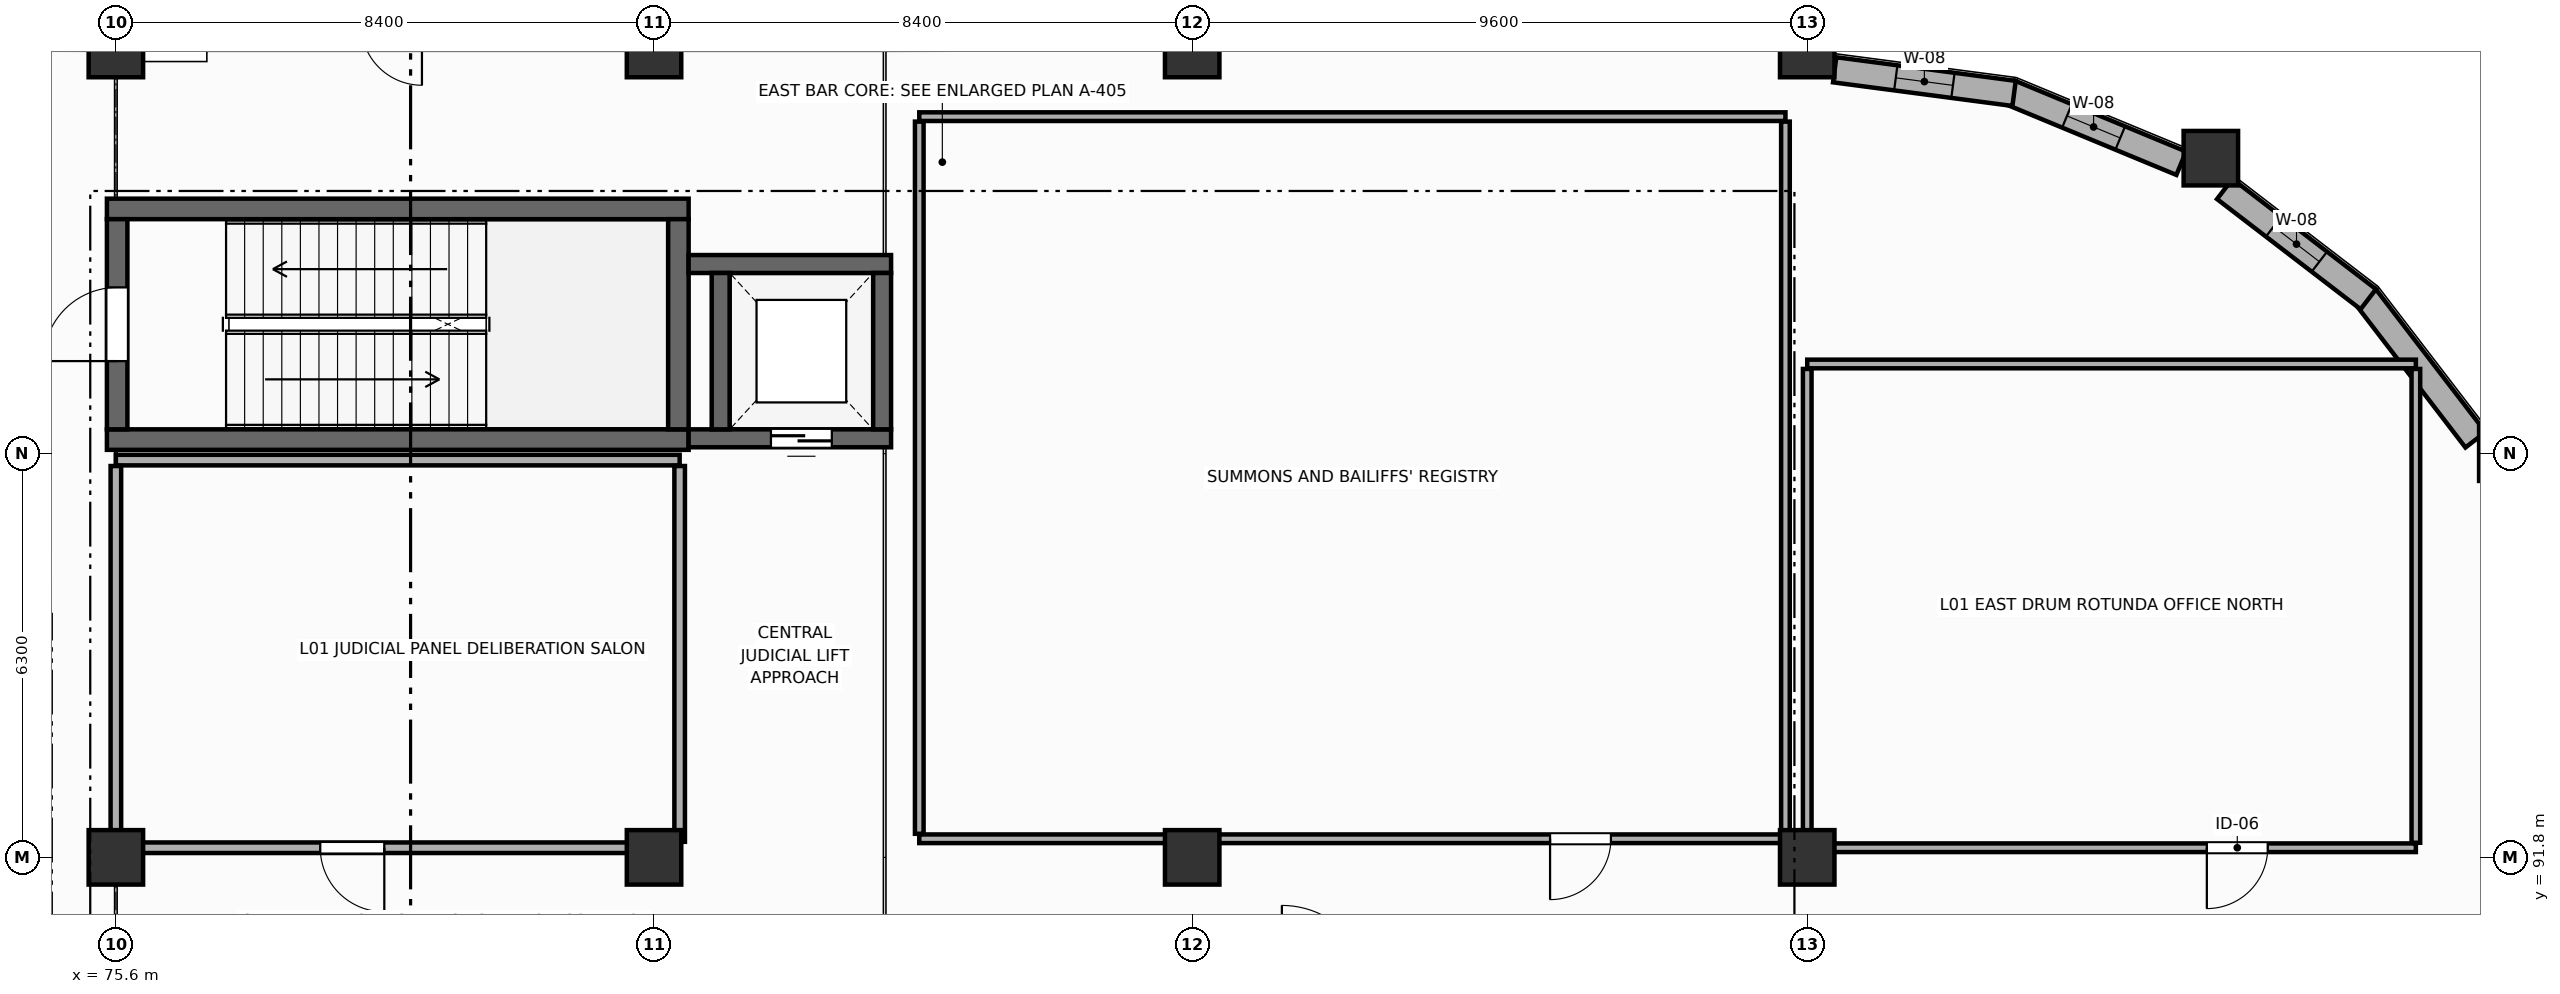
"""IFC4 building model, lengths in metres.
Left out: names, types, materials, properties, quantities, classifications, styles, units other than length and angle.
Written with IfcOpenShell. Run it as: python <this file> out.ifc"""

import sys

from ifc_helpers import new_model, si_unit, direction, frame, frame_2d, origin, origin_2d, place, context, subcontext, project, spatial, rectangle, circle, extrude, element, fill, save


model = new_model("IFC4")
c1 = context("Model", 3, precision=1e-05, world=origin(), true_north=direction((0.0, 1.0)))
c2 = subcontext(c1, "Body", "Model", "MODEL_VIEW")
j1 = project(units=[si_unit("LENGTHUNIT", "METRE"), si_unit("PLANEANGLEUNIT", "RADIAN")], contexts=[c1])
p1 = place(None, origin())
s1 = spatial("IfcSite", under=j1, at=p1, CompositionType="ELEMENT")
p2 = place(p1, origin())
s2 = spatial("IfcBuilding", under=s1, at=p2, CompositionType="ELEMENT")
p3 = place(p2, origin())
s3 = spatial("IfcBuildingStorey", under=s2, at=p3, CompositionType="ELEMENT", Elevation=0.0)
for number, where, z_axis, x_axis in (
    (1, (75.6, 91.8, 0.0), (0.0, 0.0, 1.0), (1.0, 0.0, 0.0)),
    (2, (75.6, 104.4, 0.0), (0.0, 0.0, 1.0), (1.0, 0.0, 0.0)),
    (3, (84.0, 91.8, 0.0), (0.0, 0.0, 1.0), (1.0, 0.0, 0.0)),
    (4, (84.0, 104.4, 0.0), (0.0, 0.0, 1.0), (1.0, 0.0, 0.0)),
    (5, (92.4, 91.8, 0.0), (0.0, 0.0, 1.0), (1.0, 0.0, 0.0)),
    (6, (92.4, 104.4, 0.0), (0.0, 0.0, 1.0), (1.0, 0.0, 0.0)),
    (7, (102.0, 91.8, 0.0), (0.0, 0.0, 1.0), (1.0, 0.0, 0.0)),
    (8, (102.0, 104.4, 0.0), (0.0, 0.0, 1.0), (1.0, 0.0, 0.0)),
):
    element("IfcColumn", number, at=place(p3, frame(where, z_axis=z_axis, x_axis=x_axis)), inside=s3, PredefinedType="COLUMN", context=c2, shape_type="SweptSolid", body=[
        extrude(rectangle(XDim=0.85, YDim=0.85, at=origin_2d()), origin(), (0.0, 0.0, 1.0), 5.4),
    ])
for number, where, z_axis, x_axis in (
    (9, (112.912, 98.1, 0.0), (0.0, 0.0, 1.0), (1.0, 0.0, 0.0)),
    (10, (108.3, 102.712, 0.0), (0.0, 0.0, 1.0), (1.0, 0.0, 0.0)),
):
    element("IfcColumn", number, at=place(p3, frame(where, z_axis=z_axis, x_axis=x_axis)), inside=s3, PredefinedType="COLUMN", context=c2, shape_type="SweptSolid", body=[
        extrude(circle(Radius=0.425, at=origin_2d()), origin(), (0.0, 0.0, 1.0), 5.4),
    ])
p4 = place(p3, frame((112.43, 98.317, 0.0), z_axis=(0.0, 0.0, 1.0), x_axis=(-0.608732750311, 0.793375345407, 0.0)))
e11 = element("IfcWall", 11, at=p4, inside=s3, PredefinedType="ELEMENTEDWALL", context=c2, shape_type="SweptSolid", body=[
    extrude(rectangle(XDim=2.824, YDim=0.395, at=frame_2d((1.412, 0.0))), origin(), (0.0, 0.0, 1.0), 4.27),
])
p5 = place(p3, frame((110.757, 100.511, 0.0), z_axis=(0.0, 0.0, 1.0), x_axis=(-0.793375345407, 0.608732750311, 0.0)))
e12 = element("IfcWall", 12, at=p5, inside=s3, PredefinedType="ELEMENTEDWALL", context=c2, shape_type="SweptSolid", body=[
    extrude(rectangle(XDim=2.824, YDim=0.395, at=frame_2d((1.412, 0.0))), origin(), (0.0, 0.0, 1.0), 4.17),
])
p6 = place(p5, frame((0.962, 0.0, 0.85)))
e13 = element("IfcOpeningElement", 13, at=p6, cuts=e12, PredefinedType="OPENING", context=c2, shape_type="SweptSolid", body=[
    extrude(rectangle(XDim=0.9, YDim=1.85, at=frame_2d((0.45, 0.925))), frame((0.0, 0.208, 0.0), z_axis=(0.0, -1.0, 0.0), x_axis=(1.0, 0.0, 0.0)), (0.0, 0.0, 1.0), 0.415),
])
p7 = place(p3, frame((107.837, 102.633, 0.0), z_axis=(0.0, 0.0, 1.0), x_axis=(-0.923854257916, 0.382744444937, 0.0)))
e14 = element("IfcWall", 14, at=p7, inside=s3, PredefinedType="ELEMENTEDWALL", context=c2, shape_type="SweptSolid", body=[
    extrude(rectangle(XDim=2.892, YDim=0.395, at=frame_2d((1.446, 0.0))), origin(), (0.0, 0.0, 1.0), 4.17),
])
p8 = place(p7, frame((1.03, 0.0, 0.85)))
e15 = element("IfcOpeningElement", 15, at=p8, cuts=e14, PredefinedType="OPENING", context=c2, shape_type="SweptSolid", body=[
    extrude(rectangle(XDim=0.9, YDim=1.85, at=frame_2d((0.45, 0.925))), frame((0.0, 0.208, 0.0), z_axis=(0.0, -1.0, 0.0), x_axis=(1.0, 0.0, 0.0)), (0.0, 0.0, 1.0), 0.415),
])
p9 = place(p3, frame((105.229, 103.723, 0.0), z_axis=(0.0, 0.0, 1.0), x_axis=(-0.991455178228, 0.130447803989, 0.0)))
e16 = element("IfcWall", 16, at=p9, inside=s3, PredefinedType="ELEMENTEDWALL", context=c2, shape_type="SweptSolid", body=[
    extrude(rectangle(XDim=2.824, YDim=0.395, at=frame_2d((1.412, 0.0))), origin(), (0.0, 0.0, 1.0), 4.27),
])
p10 = place(p9, frame((0.962, 0.0, 0.85)))
e17 = element("IfcOpeningElement", 17, at=p10, cuts=e16, PredefinedType="OPENING", context=c2, shape_type="SweptSolid", body=[
    extrude(rectangle(XDim=0.9, YDim=1.85, at=frame_2d((0.45, 0.925))), frame((0.0, 0.208, 0.0), z_axis=(0.0, -1.0, 0.0), x_axis=(1.0, 0.0, 0.0)), (0.0, 0.0, 1.0), 0.415),
])
for number, where, z_axis, x_axis in (
    (18, (75.46, 101.92, 0.0), (0.0, 0.0, 1.0), (1.0, 0.0, 0.0)),
    (19, (84.54, 98.32, 0.0), (0.0, 0.0, 1.0), (-1.0, 0.0, 0.0)),
):
    element("IfcWall", number, at=place(p3, frame(where, z_axis=z_axis, x_axis=x_axis)), inside=s3, PredefinedType="SHEAR", context=c2, shape_type="SweptSolid", body=[
        extrude(rectangle(XDim=9.08, YDim=0.32, at=frame_2d((4.54, 0.0))), origin(), (0.0, 0.0, 1.0), 5.14),
    ])
p11 = place(p3, frame((75.62, 98.48, 0.0), z_axis=(0.0, 0.0, 1.0), x_axis=(0.0, 1.0, 0.0)))
e20 = element("IfcWall", 20, at=p11, inside=s3, PredefinedType="SHEAR", context=c2, shape_type="SweptSolid", body=[
    extrude(rectangle(XDim=3.28, YDim=0.32, at=frame_2d((1.64, 0.0))), origin(), (0.0, 0.0, 1.0), 5.14),
])
p12 = place(p11, frame((1.065, 0.0, 0.0)))
e21 = element("IfcOpeningElement", 21, at=p12, cuts=e20, PredefinedType="OPENING", context=c2, shape_type="SweptSolid", body=[
    extrude(rectangle(XDim=1.15, YDim=2.2, at=frame_2d((0.575, 1.1))), frame((0.0, 0.17, 0.0), z_axis=(0.0, -1.0, 0.0), x_axis=(1.0, 0.0, 0.0)), (0.0, 0.0, 1.0), 0.34),
])
p13 = place(p3, frame((84.38, 101.76, 0.0), z_axis=(0.0, 0.0, 1.0), x_axis=(0.0, -1.0, 0.0)))
e22 = element("IfcWall", 22, at=p13, inside=s3, PredefinedType="SHEAR", context=c2, shape_type="SweptSolid", body=[
    extrude(rectangle(XDim=3.28, YDim=0.32, at=frame_2d((1.64, 0.0))), origin(), (0.0, 0.0, 1.0), 5.14),
])
p14 = place(p3, frame((84.54, 101.06, 0.0), z_axis=(0.0, 0.0, 1.0), x_axis=(1.0, 0.0, 0.0)))
e23 = element("IfcWall", 23, at=p14, inside=s3, PredefinedType="SHEAR", context=c2, shape_type="SweptSolid", body=[
    extrude(rectangle(XDim=3.16, YDim=0.28, at=frame_2d((1.58, 0.0))), origin(), (0.0, 0.0, 1.0), 5.14),
])
p15 = place(p3, frame((87.7, 98.34, 0.0), z_axis=(0.0, 0.0, 1.0), x_axis=(-1.0, 0.0, 0.0)))
e24 = element("IfcWall", 24, at=p15, inside=s3, PredefinedType="SHEAR", context=c2, shape_type="SweptSolid", body=[
    extrude(rectangle(XDim=3.16, YDim=0.28, at=frame_2d((1.58, 0.0))), origin(), (0.0, 0.0, 1.0), 5.14),
])
p16 = place(p15, frame((0.925, 0.0, 0.0)))
e25 = element("IfcOpeningElement", 25, at=p16, cuts=e24, PredefinedType="OPENING", context=c2, shape_type="SweptSolid", body=[
    extrude(rectangle(XDim=0.95, YDim=2.15, at=frame_2d((0.475, 1.075))), frame((0.0, 0.15, 0.0), z_axis=(0.0, -1.0, 0.0), x_axis=(1.0, 0.0, 0.0)), (0.0, 0.0, 1.0), 0.3),
])
for number, where, z_axis, x_axis in (
    (26, (85.04, 98.48, 0.0), (0.0, 0.0, 1.0), (0.0, 1.0, 0.0)),
    (27, (87.56, 100.92, 0.0), (0.0, 0.0, 1.0), (0.0, -1.0, 0.0)),
):
    element("IfcWall", number, at=place(p3, frame(where, z_axis=z_axis, x_axis=x_axis)), inside=s3, PredefinedType="SHEAR", context=c2, shape_type="SweptSolid", body=[
        extrude(rectangle(XDim=2.44, YDim=0.28, at=frame_2d((1.22, 0.0))), origin(), (0.0, 0.0, 1.0), 5.14),
    ])
p17 = place(p3, frame((75.6, 98.0, 0.0), z_axis=(0.0, 0.0, 1.0), x_axis=(1.0, 0.0, 0.0)))
e28 = element("IfcWall", 28, at=p17, inside=s3, PredefinedType="PARTITIONING", context=c2, shape_type="SweptSolid", body=[
    extrude(rectangle(XDim=8.8, YDim=0.165, at=frame_2d((4.4, 0.0))), origin(), (0.0, 0.0, 1.0), 4.27),
])
p18 = place(p3, frame((84.4, 91.95, 0.0), z_axis=(0.0, 0.0, 1.0), x_axis=(-1.0, 0.0, 0.0)))
e29 = element("IfcWall", 29, at=p18, inside=s3, PredefinedType="PARTITIONING", context=c2, shape_type="SweptSolid", body=[
    extrude(rectangle(XDim=8.8, YDim=0.165, at=frame_2d((4.4, 0.0))), origin(), (0.0, 0.0, 1.0), 4.27),
])
p19 = place(p18, frame((4.61, 0.0, 0.0)))
e30 = element("IfcOpeningElement", 30, at=p19, cuts=e29, PredefinedType="OPENING", context=c2, shape_type="SweptSolid", body=[
    extrude(rectangle(XDim=1.0, YDim=2.15, at=frame_2d((0.5, 1.075))), frame((0.0, 0.093, 0.0), z_axis=(0.0, -1.0, 0.0), x_axis=(1.0, 0.0, 0.0)), (0.0, 0.0, 1.0), 0.185),
])
for number, where, z_axis, x_axis in (
    (31, (75.6, 92.042, 0.0), (0.0, 0.0, 1.0), (0.0, 1.0, 0.0)),
    (32, (84.4, 97.907, 0.0), (0.0, 0.0, 1.0), (0.0, -1.0, 0.0)),
):
    element("IfcWall", number, at=place(p3, frame(where, z_axis=z_axis, x_axis=x_axis)), inside=s3, PredefinedType="PARTITIONING", context=c2, shape_type="SweptSolid", body=[
        extrude(rectangle(XDim=5.865, YDim=0.165, at=frame_2d((2.933, 0.0))), origin(), (0.0, 0.0, 1.0), 4.27),
    ])
p20 = place(p3, frame((88.14, 103.36, 0.0), z_axis=(0.0, 0.0, 1.0), x_axis=(1.0, 0.0, 0.0)))
e33 = element("IfcWall", 33, at=p20, inside=s3, PredefinedType="PARTITIONING", context=c2, shape_type="SweptSolid", body=[
    extrude(rectangle(XDim=13.52, YDim=0.135, at=frame_2d((6.76, 0.0))), origin(), (0.0, 0.0, 1.0), 4.27),
])
p21 = place(p3, frame((101.66, 92.09, 0.0), z_axis=(0.0, 0.0, 1.0), x_axis=(-1.0, 0.0, 0.0)))
e34 = element("IfcWall", 34, at=p21, inside=s3, PredefinedType="PARTITIONING", context=c2, shape_type="SweptSolid", body=[
    extrude(rectangle(XDim=13.52, YDim=0.135, at=frame_2d((6.76, 0.0))), origin(), (0.0, 0.0, 1.0), 4.27),
])
p22 = place(p21, frame((2.724, 0.0, 0.0)))
e35 = element("IfcOpeningElement", 35, at=p22, cuts=e34, PredefinedType="OPENING", context=c2, shape_type="SweptSolid", body=[
    extrude(rectangle(XDim=0.95, YDim=2.15, at=frame_2d((0.475, 1.075))), frame((0.0, 0.077, 0.0), z_axis=(0.0, -1.0, 0.0), x_axis=(1.0, 0.0, 0.0)), (0.0, 0.0, 1.0), 0.155),
])
p23 = place(p3, frame((88.14, 92.167, 0.0), z_axis=(0.0, 0.0, 1.0), x_axis=(0.0, 1.0, 0.0)))
e36 = element("IfcWall", 36, at=p23, inside=s3, PredefinedType="PARTITIONING", context=c2, shape_type="SweptSolid", body=[
    extrude(rectangle(XDim=11.115, YDim=0.135, at=frame_2d((5.558, 0.0))), origin(), (0.0, 0.0, 1.0), 4.47),
])
p24 = place(p3, frame((101.66, 103.282, 0.0), z_axis=(0.0, 0.0, 1.0), x_axis=(0.0, -1.0, 0.0)))
e37 = element("IfcWall", 37, at=p24, inside=s3, PredefinedType="PARTITIONING", context=c2, shape_type="SweptSolid", body=[
    extrude(rectangle(XDim=11.115, YDim=0.135, at=frame_2d((5.558, 0.0))), origin(), (0.0, 0.0, 1.0), 4.27),
])
p25 = place(p3, frame((102.0, 99.5, 0.0), z_axis=(0.0, 0.0, 1.0), x_axis=(1.0, 0.0, 0.0)))
e38 = element("IfcWall", 38, at=p25, inside=s3, PredefinedType="PARTITIONING", context=c2, shape_type="SweptSolid", body=[
    extrude(rectangle(XDim=9.5, YDim=0.135, at=frame_2d((4.75, 0.0))), origin(), (0.0, 0.0, 1.0), 4.17),
])
p26 = place(p3, frame((111.5, 91.95, 0.0), z_axis=(0.0, 0.0, 1.0), x_axis=(-1.0, 0.0, 0.0)))
e39 = element("IfcWall", 39, at=p26, inside=s3, PredefinedType="PARTITIONING", context=c2, shape_type="SweptSolid", body=[
    extrude(rectangle(XDim=9.5, YDim=0.135, at=frame_2d((4.75, 0.0))), origin(), (0.0, 0.0, 1.0), 4.17),
])
p27 = place(p26, frame((2.312, 0.0, 0.0)))
e40 = element("IfcOpeningElement", 40, at=p27, cuts=e39, PredefinedType="OPENING", context=c2, shape_type="SweptSolid", body=[
    extrude(rectangle(XDim=0.95, YDim=2.15, at=frame_2d((0.475, 1.075))), frame((0.0, 0.077, 0.0), z_axis=(0.0, -1.0, 0.0), x_axis=(1.0, 0.0, 0.0)), (0.0, 0.0, 1.0), 0.155),
])
for number, where, z_axis, x_axis in (
    (41, (102.0, 92.028, 0.0), (0.0, 0.0, 1.0), (0.0, 1.0, 0.0)),
    (42, (111.5, 99.423, 0.0), (0.0, 0.0, 1.0), (0.0, -1.0, 0.0)),
):
    element("IfcWall", number, at=place(p3, frame(where, z_axis=z_axis, x_axis=x_axis)), inside=s3, PredefinedType="PARTITIONING", context=c2, shape_type="SweptSolid", body=[
        extrude(rectangle(XDim=7.395, YDim=0.135, at=frame_2d((3.698, 0.0))), origin(), (0.0, 0.0, 1.0), 4.27),
    ])
p28 = place(p6, origin())
e43 = element("IfcWindow", 43, at=p28, inside=s3, PartitioningType="SINGLE_PANEL", PredefinedType="WINDOW", context=c2, shape_type="SweptSolid", body=[
    extrude(rectangle(XDim=0.9, YDim=1.85, at=frame_2d((0.45, 0.925))), frame((0.0, 0.03, 0.0), z_axis=(0.0, -1.0, 0.0), x_axis=(1.0, 0.0, 0.0)), (0.0, 0.0, 1.0), 0.06),
])
fill(e13, e43)
p29 = place(p8, origin())
e44 = element("IfcWindow", 44, at=p29, inside=s3, PartitioningType="SINGLE_PANEL", PredefinedType="WINDOW", context=c2, shape_type="SweptSolid", body=[
    extrude(rectangle(XDim=0.9, YDim=1.85, at=frame_2d((0.45, 0.925))), frame((0.0, 0.03, 0.0), z_axis=(0.0, -1.0, 0.0), x_axis=(1.0, 0.0, 0.0)), (0.0, 0.0, 1.0), 0.06),
])
fill(e15, e44)
p30 = place(p10, origin())
e45 = element("IfcWindow", 45, at=p30, inside=s3, PartitioningType="SINGLE_PANEL", PredefinedType="WINDOW", context=c2, shape_type="SweptSolid", body=[
    extrude(rectangle(XDim=0.9, YDim=1.85, at=frame_2d((0.45, 0.925))), frame((0.0, 0.03, 0.0), z_axis=(0.0, -1.0, 0.0), x_axis=(1.0, 0.0, 0.0)), (0.0, 0.0, 1.0), 0.06),
])
fill(e17, e45)
p31 = place(p12, origin())
e46 = element("IfcDoor", 46, at=p31, inside=s3, OperationType="SINGLE_SWING_LEFT", PredefinedType="DOOR", context=c2, shape_type="SweptSolid", body=[
    extrude(rectangle(XDim=1.15, YDim=2.2, at=frame_2d((0.575, 1.1))), frame((0.0, 0.025, 0.0), z_axis=(0.0, -1.0, 0.0), x_axis=(1.0, 0.0, 0.0)), (0.0, 0.0, 1.0), 0.05),
])
fill(e21, e46)
p32 = place(p16, origin())
e47 = element("IfcDoor", 47, at=p32, inside=s3, OperationType="DOUBLE_DOOR_SLIDING", PredefinedType="DOOR", context=c2, shape_type="SweptSolid", body=[
    extrude(rectangle(XDim=0.95, YDim=2.15, at=frame_2d((0.475, 1.075))), frame((0.0, 0.025, 0.0), z_axis=(0.0, -1.0, 0.0), x_axis=(1.0, 0.0, 0.0)), (0.0, 0.0, 1.0), 0.05),
])
fill(e25, e47)
p33 = place(p19, origin())
e48 = element("IfcDoor", 48, at=p33, inside=s3, OperationType="SINGLE_SWING_LEFT", PredefinedType="DOOR", context=c2, shape_type="SweptSolid", body=[
    extrude(rectangle(XDim=1.0, YDim=2.15, at=frame_2d((0.5, 1.075))), frame((0.0, 0.025, 0.0), z_axis=(0.0, -1.0, 0.0), x_axis=(1.0, 0.0, 0.0)), (0.0, 0.0, 1.0), 0.05),
])
fill(e30, e48)
p34 = place(p22, origin())
e49 = element("IfcDoor", 49, at=p34, inside=s3, OperationType="SINGLE_SWING_RIGHT", PredefinedType="DOOR", context=c2, shape_type="SweptSolid", body=[
    extrude(rectangle(XDim=0.95, YDim=2.15, at=frame_2d((0.475, 1.075))), frame((0.0, 0.025, 0.0), z_axis=(0.0, -1.0, 0.0), x_axis=(1.0, 0.0, 0.0)), (0.0, 0.0, 1.0), 0.05),
])
fill(e35, e49)
p35 = place(p27, origin())
e50 = element("IfcDoor", 50, at=p35, inside=s3, OperationType="SINGLE_SWING_RIGHT", PredefinedType="DOOR", context=c2, shape_type="SweptSolid", body=[
    extrude(rectangle(XDim=0.95, YDim=2.15, at=frame_2d((0.475, 1.075))), frame((0.0, 0.025, 0.0), z_axis=(0.0, -1.0, 0.0), x_axis=(1.0, 0.0, 0.0)), (0.0, 0.0, 1.0), 0.05),
])
fill(e40, e50)
save(model, sys.argv[1])
